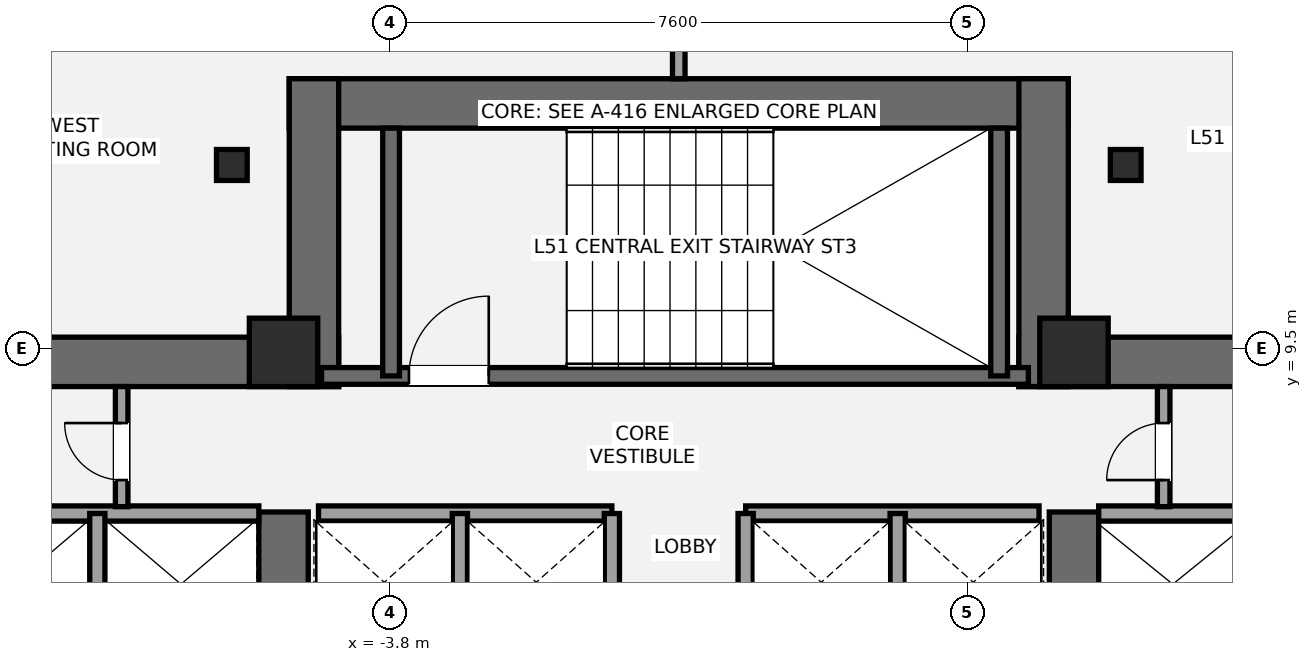
"""IFC4 building model, lengths in metres.
Left out: names, types, materials, properties, quantities, classifications, styles, units other than length and angle.
Written with IfcOpenShell. Run it as: python <this file> out.ifc"""

import sys

from ifc_helpers import new_model, si_unit, direction, frame, frame_2d, origin, origin_2d, place, context, subcontext, project, spatial, rectangle, i_section, extrude, element, fill, save


model = new_model("IFC4")
c1 = context("Model", 3, precision=1e-05, world=origin(), true_north=direction((0.0, 1.0)))
c2 = subcontext(c1, "Body", "Model", "MODEL_VIEW")
j1 = project(units=[si_unit("LENGTHUNIT", "METRE"), si_unit("PLANEANGLEUNIT", "RADIAN")], contexts=[c1])
p1 = place(None, origin())
s1 = spatial("IfcSite", under=j1, at=p1, CompositionType="ELEMENT")
p2 = place(p1, origin())
s2 = spatial("IfcBuilding", under=s1, at=p2, CompositionType="ELEMENT")
p3 = place(p2, frame((0.0, 0.0, 185.4)))
s3 = spatial("IfcBuildingStorey", under=s2, at=p3, CompositionType="ELEMENT", Elevation=185.4)
p4 = place(p3, frame((-13.8, 9.325, 0.0), z_axis=(0.0, 0.0, 1.0), x_axis=(1.0, 0.0, 0.0)))
e1 = element("IfcWall", 1, at=p4, inside=s3, PredefinedType="SHEAR", context=c2, shape_type="SweptSolid", body=[
    extrude(rectangle(XDim=9.325, YDim=0.65, at=frame_2d((4.663, 0.0))), origin(), (0.0, 0.0, 1.0), 3.2),
])
p5 = place(p3, frame((-5.2, 5.35, 0.0), z_axis=(0.0, 0.0, 1.0), x_axis=(0.0, 1.0, 0.0)))
e2 = element("IfcWall", 2, at=p5, inside=s3, PredefinedType="SHEAR", context=c2, shape_type="SweptSolid", body=[
    extrude(rectangle(XDim=2.0, YDim=0.65, at=frame_2d((1.0, 0.0))), origin(), (0.0, 0.0, 1.0), 3.2),
])
p6 = place(p3, frame((4.475, 9.325, 0.0), z_axis=(0.0, 0.0, 1.0), x_axis=(1.0, 0.0, 0.0)))
e3 = element("IfcWall", 3, at=p6, inside=s3, PredefinedType="SHEAR", context=c2, shape_type="SweptSolid", body=[
    extrude(rectangle(XDim=9.325, YDim=0.65, at=frame_2d((4.663, 0.0))), origin(), (0.0, 0.0, 1.0), 3.2),
])
p7 = place(p3, frame((5.2, 5.35, 0.0), z_axis=(0.0, 0.0, 1.0), x_axis=(0.0, 1.0, 0.0)))
e4 = element("IfcWall", 4, at=p7, inside=s3, PredefinedType="SHEAR", context=c2, shape_type="SweptSolid", body=[
    extrude(rectangle(XDim=2.0, YDim=0.65, at=frame_2d((1.0, 0.0))), origin(), (0.0, 0.0, 1.0), 3.2),
])
p8 = place(p3, frame((-5.125, 12.725, 0.0), z_axis=(0.0, 0.0, 1.0), x_axis=(1.0, 0.0, 0.0)))
e5 = element("IfcWall", 5, at=p8, inside=s3, PredefinedType="SHEAR", context=c2, shape_type="SweptSolid", body=[
    extrude(rectangle(XDim=10.25, YDim=0.65, at=frame_2d((5.125, 0.0))), origin(), (0.0, 0.0, 1.0), 3.2),
])
for number, where, z_axis, x_axis in (
    (6, (-4.8, 9.0, 0.0), (0.0, 0.0, 1.0), (0.0, 1.0, 0.0)),
    (7, (4.8, 9.0, 0.0), (0.0, 0.0, 1.0), (0.0, 1.0, 0.0)),
):
    element("IfcWall", number, at=place(p3, frame(where, z_axis=z_axis, x_axis=x_axis)), inside=s3, PredefinedType="SHEAR", context=c2, shape_type="SweptSolid", body=[
        extrude(rectangle(XDim=4.05, YDim=0.65, at=frame_2d((2.025, 0.0))), origin(), (0.0, 0.0, 1.0), 3.2),
    ])
p9 = place(p3, frame((-4.7, 9.14, 0.0), z_axis=(0.0, 0.0, 1.0), x_axis=(1.0, 0.0, 0.0)))
e8 = element("IfcWall", 8, at=p9, inside=s3, PredefinedType="SHEAR", context=c2, shape_type="SweptSolid", body=[
    extrude(rectangle(XDim=9.3, YDim=0.22, at=frame_2d((4.65, 0.0))), origin(), (0.0, 0.0, 1.0), 3.2),
])
p10 = place(p9, frame((1.15, 0.0, 0.0)))
e9 = element("IfcOpeningElement", 9, at=p10, cuts=e8, PredefinedType="OPENING", context=c2, shape_type="SweptSolid", body=[
    extrude(rectangle(XDim=1.05, YDim=2.15, at=frame_2d((0.525, 1.075))), frame((0.0, 0.12, 0.0), z_axis=(0.0, -1.0, 0.0), x_axis=(1.0, 0.0, 0.0)), (0.0, 0.0, 1.0), 0.24),
])
for number, where, z_axis, x_axis in (
    (10, (-3.785, 9.14, 0.0), (0.0, 0.0, 1.0), (0.0, 1.0, 0.0)),
    (11, (4.215, 9.14, 0.0), (0.0, 0.0, 1.0), (0.0, 1.0, 0.0)),
):
    element("IfcWall", number, at=place(p3, frame(where, z_axis=z_axis, x_axis=x_axis)), inside=s3, PredefinedType="SHEAR", context=c2, shape_type="SweptSolid", body=[
        extrude(rectangle(XDim=3.26, YDim=0.22, at=frame_2d((1.63, 0.0))), origin(), (0.0, 0.0, 1.0), 3.2),
    ])
for number, where, z_axis, x_axis in (
    (12, (-5.2, 9.45, 0.0), (0.0, 0.0, 1.0), (1.0, 0.0, 0.0)),
    (13, (5.2, 9.45, 0.0), (0.0, 0.0, 1.0), (1.0, 0.0, 0.0)),
):
    element("IfcColumn", number, at=place(p3, frame(where, z_axis=z_axis, x_axis=x_axis)), inside=s3, PredefinedType="COLUMN", context=c2, shape_type="SweptSolid", body=[
        extrude(rectangle(XDim=0.9, YDim=0.9, at=origin_2d()), origin(), (0.0, 0.0, 1.0), 3.2),
    ])
for number, where, z_axis, x_axis in (
    (14, (5.88, 11.915, 0.0), (0.0, 0.0, 1.0), (1.0, 0.0, 0.0)),
    (15, (-5.88, 11.915, 0.0), (0.0, 0.0, 1.0), (1.0, 0.0, 0.0)),
):
    element("IfcColumn", number, at=place(p3, frame(where, z_axis=z_axis, x_axis=x_axis)), inside=s3, PredefinedType="COLUMN", context=c2, shape_type="SweptSolid", body=[
        extrude(i_section(OverallWidth=0.404, OverallDepth=0.407, WebThickness=0.027, FlangeThickness=0.044, at=origin_2d()), origin(), (0.0, 0.0, 1.0), 3.2),
    ])
p11 = place(p3, frame((-9.78, 7.33, 0.0), z_axis=(0.0, 0.0, 1.0), x_axis=(1.0, 0.0, 0.0)))
e16 = element("IfcWall", 16, at=p11, inside=s3, PredefinedType="SOLIDWALL", context=c2, shape_type="SweptSolid", body=[
    extrude(rectangle(XDim=4.255, YDim=0.2, at=frame_2d((2.127, 0.0))), origin(), (0.0, 0.0, 1.0), 3.02),
])
p12 = place(p3, frame((-7.65, 5.47, 0.0), z_axis=(0.0, 0.0, 1.0), x_axis=(0.0, 1.0, 0.0)))
e17 = element("IfcWall", 17, at=p12, inside=s3, PredefinedType="SOLIDWALL", context=c2, shape_type="SweptSolid", body=[
    extrude(rectangle(XDim=1.86, YDim=0.2, at=frame_2d((0.93, 0.0))), origin(), (0.0, 0.0, 1.0), 3.02),
])
p13 = place(p3, frame((5.525, 7.33, 0.0), z_axis=(0.0, 0.0, 1.0), x_axis=(1.0, 0.0, 0.0)))
e18 = element("IfcWall", 18, at=p13, inside=s3, PredefinedType="SOLIDWALL", context=c2, shape_type="SweptSolid", body=[
    extrude(rectangle(XDim=4.255, YDim=0.2, at=frame_2d((2.127, 0.0))), origin(), (0.0, 0.0, 1.0), 3.02),
])
for number, where, z_axis, x_axis in (
    (19, (-4.74, 7.33, 0.0), (0.0, 0.0, 1.0), (1.0, 0.0, 0.0)),
    (20, (0.88, 7.33, 0.0), (0.0, 0.0, 1.0), (1.0, 0.0, 0.0)),
):
    element("IfcWall", number, at=place(p3, frame(where, z_axis=z_axis, x_axis=x_axis)), inside=s3, PredefinedType="SOLIDWALL", context=c2, shape_type="SweptSolid", body=[
        extrude(rectangle(XDim=3.86, YDim=0.2, at=frame_2d((1.93, 0.0))), origin(), (0.0, 0.0, 1.0), 3.02),
    ])
for number, where, z_axis, x_axis in (
    (21, (-2.88, 5.52, 0.0), (0.0, 0.0, 1.0), (0.0, 1.0, 0.0)),
    (22, (2.88, 5.52, 0.0), (0.0, 0.0, 1.0), (0.0, 1.0, 0.0)),
    (23, (-0.88, 5.52, 0.0), (0.0, 0.0, 1.0), (0.0, 1.0, 0.0)),
    (24, (0.88, 5.52, 0.0), (0.0, 0.0, 1.0), (0.0, 1.0, 0.0)),
):
    element("IfcWall", number, at=place(p3, frame(where, z_axis=z_axis, x_axis=x_axis)), inside=s3, PredefinedType="SOLIDWALL", context=c2, shape_type="SweptSolid", body=[
        extrude(rectangle(XDim=1.81, YDim=0.2, at=frame_2d((0.905, 0.0))), origin(), (0.0, 0.0, 1.0), 3.02),
    ])
p14 = place(p3, frame((-7.33, 7.42, 0.0), z_axis=(0.0, 0.0, 1.0), x_axis=(0.0, 1.0, 0.0)))
e25 = element("IfcWall", 25, at=p14, inside=s3, PredefinedType="PARTITIONING", context=c2, shape_type="SweptSolid", body=[
    extrude(rectangle(XDim=1.58, YDim=0.165, at=frame_2d((0.79, 0.0))), origin(), (0.0, 0.0, 1.0), 3.02),
])
p15 = place(p14, frame((0.35, 0.0, 0.0)))
e26 = element("IfcOpeningElement", 26, at=p15, cuts=e25, PredefinedType="OPENING", context=c2, shape_type="SweptSolid", body=[
    extrude(rectangle(XDim=0.75, YDim=2.1, at=frame_2d((0.375, 1.05))), frame((0.0, 0.093, 0.0), z_axis=(0.0, -1.0, 0.0), x_axis=(1.0, 0.0, 0.0)), (0.0, 0.0, 1.0), 0.185),
])
p16 = place(p3, frame((6.38, 7.42, 0.0), z_axis=(0.0, 0.0, 1.0), x_axis=(0.0, 1.0, 0.0)))
e27 = element("IfcWall", 27, at=p16, inside=s3, PredefinedType="PARTITIONING", context=c2, shape_type="SweptSolid", body=[
    extrude(rectangle(XDim=1.58, YDim=0.165, at=frame_2d((0.79, 0.0))), origin(), (0.0, 0.0, 1.0), 3.02),
])
p17 = place(p16, frame((0.35, 0.0, 0.0)))
e28 = element("IfcOpeningElement", 28, at=p17, cuts=e27, PredefinedType="OPENING", context=c2, shape_type="SweptSolid", body=[
    extrude(rectangle(XDim=0.75, YDim=2.1, at=frame_2d((0.375, 1.05))), frame((0.0, 0.093, 0.0), z_axis=(0.0, -1.0, 0.0), x_axis=(1.0, 0.0, 0.0)), (0.0, 0.0, 1.0), 0.185),
])
p18 = place(p3, frame((0.0, 13.05, 0.0), z_axis=(0.0, 0.0, 1.0), x_axis=(0.0, 1.0, 0.0)))
e29 = element("IfcWall", 29, at=p18, inside=s3, PredefinedType="PARTITIONING", context=c2, shape_type="SweptSolid", body=[
    extrude(rectangle(XDim=3.398, YDim=0.165, at=frame_2d((1.699, 0.0))), origin(), (0.0, 0.0, 1.0), 3.02),
])
p19 = place(p10, origin())
e30 = element("IfcDoor", 30, at=p19, inside=s3, OperationType="SINGLE_SWING_RIGHT", PredefinedType="DOOR", context=c2, shape_type="SweptSolid", body=[
    extrude(rectangle(XDim=1.05, YDim=2.15, at=frame_2d((0.525, 1.075))), frame((0.0, 0.025, 0.0), z_axis=(0.0, -1.0, 0.0), x_axis=(1.0, 0.0, 0.0)), (0.0, 0.0, 1.0), 0.05),
])
fill(e9, e30)
p20 = place(p15, origin())
e31 = element("IfcDoor", 31, at=p20, inside=s3, OperationType="SINGLE_SWING_RIGHT", PredefinedType="DOOR", context=c2, shape_type="SweptSolid", body=[
    extrude(rectangle(XDim=0.75, YDim=2.1, at=frame_2d((0.375, 1.05))), frame((0.0, 0.025, 0.0), z_axis=(0.0, -1.0, 0.0), x_axis=(1.0, 0.0, 0.0)), (0.0, 0.0, 1.0), 0.05),
])
fill(e26, e31)
p21 = place(p17, origin())
e32 = element("IfcDoor", 32, at=p21, inside=s3, OperationType="SINGLE_SWING_LEFT", PredefinedType="DOOR", context=c2, shape_type="SweptSolid", body=[
    extrude(rectangle(XDim=0.75, YDim=2.1, at=frame_2d((0.375, 1.05))), frame((0.0, 0.025, 0.0), z_axis=(0.0, -1.0, 0.0), x_axis=(1.0, 0.0, 0.0)), (0.0, 0.0, 1.0), 0.05),
])
fill(e28, e32)
save(model, sys.argv[1])
